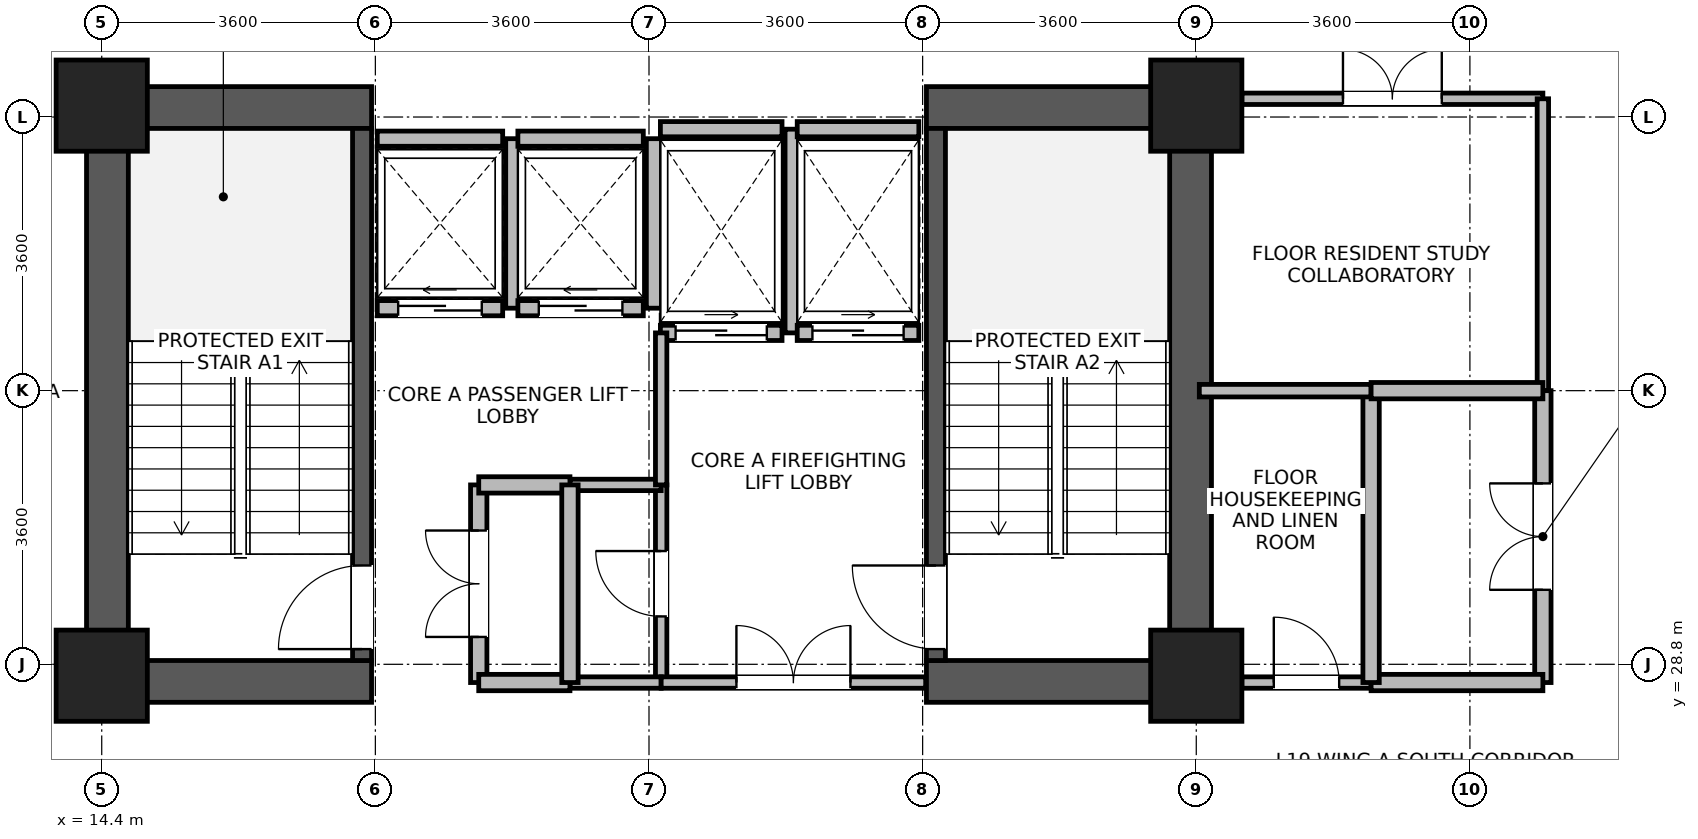
"""IFC4 building model, lengths in metres.
Left out: names, types, materials, properties, quantities, classifications, styles, units other than length and angle.
Written with IfcOpenShell. Run it as: python <this file> out.ifc"""

import sys

from ifc_helpers import new_model, si_unit, direction, frame, frame_2d, origin, origin_2d, place, context, subcontext, project, spatial, rectangle, extrude, source, transform, mapped, element, fill, save


model = new_model("IFC4")
c1 = context("Model", 3, precision=1e-05, world=origin(), true_north=direction((0.0, 1.0)))
c2 = subcontext(c1, "Body", "Model", "MODEL_VIEW")
j1 = project(units=[si_unit("LENGTHUNIT", "METRE"), si_unit("PLANEANGLEUNIT", "RADIAN")], contexts=[c1])
p1 = place(None, origin())
s1 = spatial("IfcSite", under=j1, at=p1, CompositionType="ELEMENT")
p2 = place(p1, origin())
s2 = spatial("IfcBuilding", under=s1, at=p2, CompositionType="ELEMENT")
p3 = place(p2, frame((0.0, 0.0, 78.6)))
s3 = spatial("IfcBuildingStorey", under=s2, at=p3, CompositionType="ELEMENT", Elevation=78.6)
for number, where, z_axis, x_axis in (
    (1, (14.475, 28.3, 0.0), (0.0, 0.0, 1.0), (0.0, 1.0, 0.0)),
    (2, (28.725, 28.3, 0.0), (0.0, 0.0, 1.0), (0.0, 1.0, 0.0)),
):
    element("IfcWall", number, at=place(p3, frame(where, z_axis=z_axis, x_axis=x_axis)), inside=s3, PredefinedType="SHEAR", context=c2, shape_type="SweptSolid", body=[
        extrude(rectangle(XDim=8.1, YDim=0.55, at=frame_2d((4.05, 0.0))), origin(), (0.0, 0.0, 1.0), 3.45),
    ])
for number, where, z_axis, x_axis in (
    (3, (14.75, 28.575, 0.0), (0.0, 0.0, 1.0), (1.0, 0.0, 0.0)),
    (4, (25.25, 28.575, 0.0), (0.0, 0.0, 1.0), (1.0, 0.0, 0.0)),
    (5, (14.75, 36.125, 0.0), (0.0, 0.0, 1.0), (1.0, 0.0, 0.0)),
    (6, (25.25, 36.125, 0.0), (0.0, 0.0, 1.0), (1.0, 0.0, 0.0)),
):
    element("IfcWall", number, at=place(p3, frame(where, z_axis=z_axis, x_axis=x_axis)), inside=s3, PredefinedType="SHEAR", context=c2, shape_type="SweptSolid", body=[
        extrude(rectangle(XDim=3.2, YDim=0.55, at=frame_2d((1.6, 0.0))), origin(), (0.0, 0.0, 1.0), 3.45),
    ])
p4 = place(p3, frame((17.825, 28.85, 0.0), z_axis=(0.0, 0.0, 1.0), x_axis=(0.0, 1.0, 0.0)))
e7 = element("IfcWall", 7, at=p4, inside=s3, PredefinedType="SHEAR", context=c2, shape_type="SweptSolid", body=[
    extrude(rectangle(XDim=7.0, YDim=0.25, at=frame_2d((3.5, 0.0))), origin(), (0.0, 0.0, 1.0), 3.45),
])
p5 = place(p4, frame((0.15, 0.0, 0.0)))
e8 = element("IfcOpeningElement", 8, at=p5, cuts=e7, PredefinedType="OPENING", context=c2, shape_type="SweptSolid", body=[
    extrude(rectangle(XDim=1.1, YDim=2.08, at=frame_2d((0.55, 1.04))), frame((0.0, 0.135, 0.0), z_axis=(0.0, -1.0, 0.0), x_axis=(1.0, 0.0, 0.0)), (0.0, 0.0, 1.0), 0.27),
])
p6 = place(p3, frame((25.375, 28.85, 0.0), z_axis=(0.0, 0.0, 1.0), x_axis=(0.0, 1.0, 0.0)))
e9 = element("IfcWall", 9, at=p6, inside=s3, PredefinedType="SHEAR", context=c2, shape_type="SweptSolid", body=[
    extrude(rectangle(XDim=7.0, YDim=0.25, at=frame_2d((3.5, 0.0))), origin(), (0.0, 0.0, 1.0), 3.45),
])
p7 = place(p6, frame((0.15, 0.0, 0.0)))
e10 = element("IfcOpeningElement", 10, at=p7, cuts=e9, PredefinedType="OPENING", context=c2, shape_type="SweptSolid", body=[
    extrude(rectangle(XDim=1.1, YDim=2.08, at=frame_2d((0.55, 1.04))), frame((0.0, 0.135, 0.0), z_axis=(0.0, -1.0, 0.0), x_axis=(1.0, 0.0, 0.0)), (0.0, 0.0, 1.0), 0.27),
])
m1 = source(origin(), c2, "Body", "SweptSolid", [
    extrude(rectangle(XDim=1.2, YDim=1.2, at=origin_2d()), origin(), (0.0, 0.0, 1.0), 3.7),
])
for number, where, z_axis, x_axis in (
    (11, (14.4, 28.65, 0.0), (0.0, 0.0, 1.0), (1.0, 0.0, 0.0)),
    (12, (14.4, 36.15, 0.0), (0.0, 0.0, 1.0), (1.0, 0.0, 0.0)),
    (13, (28.8, 28.65, 0.0), (0.0, 0.0, 1.0), (1.0, 0.0, 0.0)),
    (14, (28.8, 36.15, 0.0), (0.0, 0.0, 1.0), (1.0, 0.0, 0.0)),
):
    element("IfcColumn", number, at=place(p3, frame(where, z_axis=z_axis, x_axis=x_axis)), inside=s3, PredefinedType="COLUMN", context=c2, shape_type="MappedRepresentation", body=[
        mapped(m1, transform((0.0, 0.0, 0.0), x_axis=(1.0, 0.0, 0.0), y_axis=(0.0, 1.0, 0.0), z_axis=(0.0, 0.0, 1.0), scale=1.0)),
    ])
p8 = place(p3, frame((18.025, 33.485, 0.0), z_axis=(0.0, 0.0, 1.0), x_axis=(1.0, 0.0, 0.0)))
e15 = element("IfcWall", 15, at=p8, inside=s3, PredefinedType="PARTITIONING", context=c2, shape_type="SweptSolid", body=[
    extrude(rectangle(XDim=1.65, YDim=0.2, at=frame_2d((0.825, 0.0))), origin(), (0.0, 0.0, 1.0), 3.43),
])
p9 = place(p8, frame((0.275, 0.0, 0.0)))
e16 = element("IfcOpeningElement", 16, at=p9, cuts=e15, PredefinedType="OPENING", context=c2, shape_type="SweptSolid", body=[
    extrude(rectangle(XDim=1.1, YDim=2.12, at=frame_2d((0.55, 1.06))), frame((0.0, 0.11, 0.0), z_axis=(0.0, -1.0, 0.0), x_axis=(1.0, 0.0, 0.0)), (0.0, 0.0, 1.0), 0.22),
])
p10 = place(p3, frame((18.025, 35.715, 0.0), z_axis=(0.0, 0.0, 1.0), x_axis=(1.0, 0.0, 0.0)))
e17 = element("IfcWall", 17, at=p10, inside=s3, PredefinedType="PARTITIONING", context=c2, shape_type="SweptSolid", body=[
    extrude(rectangle(XDim=1.65, YDim=0.2, at=frame_2d((0.825, 0.0))), origin(), (0.0, 0.0, 1.0), 2.23),
])
p11 = place(p3, frame((19.815, 33.485, 0.0), z_axis=(0.0, 0.0, 1.0), x_axis=(0.0, 1.0, 0.0)))
e18 = element("IfcWall", 18, at=p11, inside=s3, PredefinedType="PARTITIONING", context=c2, shape_type="SweptSolid", body=[
    extrude(rectangle(XDim=2.23, YDim=0.2, at=frame_2d((1.115, 0.0))), origin(), (0.0, 0.0, 1.0), 3.43),
])
p12 = place(p3, frame((19.875, 33.485, 0.0), z_axis=(0.0, 0.0, 1.0), x_axis=(1.0, 0.0, 0.0)))
e19 = element("IfcWall", 19, at=p12, inside=s3, PredefinedType="PARTITIONING", context=c2, shape_type="SweptSolid", body=[
    extrude(rectangle(XDim=1.65, YDim=0.2, at=frame_2d((0.825, 0.0))), origin(), (0.0, 0.0, 1.0), 3.43),
])
p13 = place(p12, frame((0.275, 0.0, 0.0)))
e20 = element("IfcOpeningElement", 20, at=p13, cuts=e19, PredefinedType="OPENING", context=c2, shape_type="SweptSolid", body=[
    extrude(rectangle(XDim=1.1, YDim=2.12, at=frame_2d((0.55, 1.06))), frame((0.0, 0.11, 0.0), z_axis=(0.0, -1.0, 0.0), x_axis=(1.0, 0.0, 0.0)), (0.0, 0.0, 1.0), 0.22),
])
p14 = place(p3, frame((19.875, 35.715, 0.0), z_axis=(0.0, 0.0, 1.0), x_axis=(1.0, 0.0, 0.0)))
e21 = element("IfcWall", 21, at=p14, inside=s3, PredefinedType="PARTITIONING", context=c2, shape_type="SweptSolid", body=[
    extrude(rectangle(XDim=1.65, YDim=0.2, at=frame_2d((0.825, 0.0))), origin(), (0.0, 0.0, 1.0), 2.23),
])
p15 = place(p3, frame((21.665, 33.485, 0.0), z_axis=(0.0, 0.0, 1.0), x_axis=(0.0, 1.0, 0.0)))
e22 = element("IfcWall", 22, at=p15, inside=s3, PredefinedType="PARTITIONING", context=c2, shape_type="SweptSolid", body=[
    extrude(rectangle(XDim=2.23, YDim=0.2, at=frame_2d((1.115, 0.0))), origin(), (0.0, 0.0, 1.0), 3.43),
])
p16 = place(p3, frame((21.75, 33.16, 0.0), z_axis=(0.0, 0.0, 1.0), x_axis=(1.0, 0.0, 0.0)))
e23 = element("IfcWall", 23, at=p16, inside=s3, PredefinedType="PARTITIONING", context=c2, shape_type="SweptSolid", body=[
    extrude(rectangle(XDim=1.6, YDim=0.2, at=frame_2d((0.8, 0.0))), origin(), (0.0, 0.0, 1.0), 3.43),
])
p17 = place(p16, frame((0.2, 0.0, 0.0)))
e24 = element("IfcOpeningElement", 24, at=p17, cuts=e23, PredefinedType="OPENING", context=c2, shape_type="SweptSolid", body=[
    extrude(rectangle(XDim=1.2, YDim=2.12, at=frame_2d((0.6, 1.06))), frame((0.0, 0.11, 0.0), z_axis=(0.0, -1.0, 0.0), x_axis=(1.0, 0.0, 0.0)), (0.0, 0.0, 1.0), 0.22),
])
p18 = place(p3, frame((21.75, 35.84, 0.0), z_axis=(0.0, 0.0, 1.0), x_axis=(1.0, 0.0, 0.0)))
e25 = element("IfcWall", 25, at=p18, inside=s3, PredefinedType="PARTITIONING", context=c2, shape_type="SweptSolid", body=[
    extrude(rectangle(XDim=1.6, YDim=0.2, at=frame_2d((0.8, 0.0))), origin(), (0.0, 0.0, 1.0), 2.23),
])
p19 = place(p3, frame((23.49, 33.16, 0.0), z_axis=(0.0, 0.0, 1.0), x_axis=(0.0, 1.0, 0.0)))
e26 = element("IfcWall", 26, at=p19, inside=s3, PredefinedType="PARTITIONING", context=c2, shape_type="SweptSolid", body=[
    extrude(rectangle(XDim=2.68, YDim=0.2, at=frame_2d((1.34, 0.0))), origin(), (0.0, 0.0, 1.0), 3.43),
])
p20 = place(p3, frame((23.55, 33.16, 0.0), z_axis=(0.0, 0.0, 1.0), x_axis=(1.0, 0.0, 0.0)))
e27 = element("IfcWall", 27, at=p20, inside=s3, PredefinedType="PARTITIONING", context=c2, shape_type="SweptSolid", body=[
    extrude(rectangle(XDim=1.6, YDim=0.2, at=frame_2d((0.8, 0.0))), origin(), (0.0, 0.0, 1.0), 3.43),
])
p21 = place(p20, frame((0.2, 0.0, 0.0)))
e28 = element("IfcOpeningElement", 28, at=p21, cuts=e27, PredefinedType="OPENING", context=c2, shape_type="SweptSolid", body=[
    extrude(rectangle(XDim=1.2, YDim=2.12, at=frame_2d((0.6, 1.06))), frame((0.0, 0.11, 0.0), z_axis=(0.0, -1.0, 0.0), x_axis=(1.0, 0.0, 0.0)), (0.0, 0.0, 1.0), 0.22),
])
p22 = place(p3, frame((23.55, 35.84, 0.0), z_axis=(0.0, 0.0, 1.0), x_axis=(1.0, 0.0, 0.0)))
e29 = element("IfcWall", 29, at=p22, inside=s3, PredefinedType="PARTITIONING", context=c2, shape_type="SweptSolid", body=[
    extrude(rectangle(XDim=1.6, YDim=0.2, at=frame_2d((0.8, 0.0))), origin(), (0.0, 0.0, 1.0), 2.23),
])
p23 = place(p3, frame((29.4, 36.24, 0.0), z_axis=(0.0, 0.0, 1.0), x_axis=(1.0, 0.0, 0.0)))
e30 = element("IfcWall", 30, at=p23, inside=s3, PredefinedType="PARTITIONING", context=c2, shape_type="SweptSolid", body=[
    extrude(rectangle(XDim=3.96, YDim=0.15, at=frame_2d((1.98, 0.0))), origin(), (0.0, 0.0, 1.0), 2.78),
])
p24 = place(p23, frame((1.33, 0.0, 0.0)))
e31 = element("IfcOpeningElement", 31, at=p24, cuts=e30, PredefinedType="OPENING", context=c2, shape_type="SweptSolid", body=[
    extrude(rectangle(XDim=1.3, YDim=2.12, at=frame_2d((0.65, 1.06))), frame((0.0, 0.085, 0.0), z_axis=(0.0, -1.0, 0.0), x_axis=(1.0, 0.0, 0.0)), (0.0, 0.0, 1.0), 0.17),
])
p25 = place(p3, frame((33.36, 32.4, 0.0), z_axis=(0.0, 0.0, 1.0), x_axis=(0.0, 1.0, 0.0)))
e32 = element("IfcWall", 32, at=p25, inside=s3, PredefinedType="PARTITIONING", context=c2, shape_type="SweptSolid", body=[
    extrude(rectangle(XDim=3.84, YDim=0.15, at=frame_2d((1.92, 0.0))), origin(), (0.0, 0.0, 1.0), 3.43),
])
p26 = place(p3, frame((33.36, 28.56, 0.0), z_axis=(0.0, 0.0, 1.0), x_axis=(0.0, 1.0, 0.0)))
e33 = element("IfcWall", 33, at=p26, inside=s3, PredefinedType="PARTITIONING", context=c2, shape_type="SweptSolid", body=[
    extrude(rectangle(XDim=3.84, YDim=0.215, at=frame_2d((1.92, 0.0))), origin(), (0.0, 0.0, 1.0), 3.43),
])
p27 = place(p26, frame((1.22, 0.0, 0.0)))
e34 = element("IfcOpeningElement", 34, at=p27, cuts=e33, PredefinedType="OPENING", context=c2, shape_type="SweptSolid", body=[
    extrude(rectangle(XDim=1.4, YDim=2.15, at=frame_2d((0.7, 1.075))), frame((0.0, 0.118, 0.0), z_axis=(0.0, -1.0, 0.0), x_axis=(1.0, 0.0, 0.0)), (0.0, 0.0, 1.0), 0.235),
])
p28 = place(p3, frame((19.36, 28.56, 0.0), z_axis=(0.0, 0.0, 1.0), x_axis=(0.0, 1.0, 0.0)))
e35 = element("IfcWall", 35, at=p28, inside=s3, PredefinedType="PARTITIONING", context=c2, shape_type="SweptSolid", body=[
    extrude(rectangle(XDim=2.6, YDim=0.215, at=frame_2d((1.3, 0.0))), origin(), (0.0, 0.0, 1.0), 3.43),
])
p29 = place(p28, frame((0.6, 0.0, 0.0)))
e36 = element("IfcOpeningElement", 36, at=p29, cuts=e35, PredefinedType="OPENING", context=c2, shape_type="SweptSolid", body=[
    extrude(rectangle(XDim=1.4, YDim=2.15, at=frame_2d((0.7, 1.075))), frame((0.0, 0.118, 0.0), z_axis=(0.0, -1.0, 0.0), x_axis=(1.0, 0.0, 0.0)), (0.0, 0.0, 1.0), 0.235),
])
p30 = place(p3, frame((21.76, 28.56, 0.0), z_axis=(0.0, 0.0, 1.0), x_axis=(0.0, 1.0, 0.0)))
e37 = element("IfcWall", 37, at=p30, inside=s3, PredefinedType="PARTITIONING", context=c2, shape_type="SweptSolid", body=[
    extrude(rectangle(XDim=2.6, YDim=0.15, at=frame_2d((1.3, 0.0))), origin(), (0.0, 0.0, 1.0), 3.43),
])
p31 = place(p30, frame((0.87, 0.0, 0.0)))
e38 = element("IfcOpeningElement", 38, at=p31, cuts=e37, PredefinedType="OPENING", context=c2, shape_type="SweptSolid", body=[
    extrude(rectangle(XDim=0.86, YDim=2.02, at=frame_2d((0.43, 1.01))), frame((0.0, 0.085, 0.0), z_axis=(0.0, -1.0, 0.0), x_axis=(1.0, 0.0, 0.0)), (0.0, 0.0, 1.0), 0.17),
])
p32 = place(p3, frame((29.4, 28.56, 0.0), z_axis=(0.0, 0.0, 1.0), x_axis=(1.0, 0.0, 0.0)))
e39 = element("IfcWall", 39, at=p32, inside=s3, PredefinedType="PARTITIONING", context=c2, shape_type="SweptSolid", body=[
    extrude(rectangle(XDim=1.7, YDim=0.15, at=frame_2d((0.85, 0.0))), origin(), (0.0, 0.0, 1.0), 2.78),
])
p33 = place(p32, frame((0.42, 0.0, 0.0)))
e40 = element("IfcOpeningElement", 40, at=p33, cuts=e39, PredefinedType="OPENING", context=c2, shape_type="SweptSolid", body=[
    extrude(rectangle(XDim=0.86, YDim=2.02, at=frame_2d((0.43, 1.01))), frame((0.0, 0.085, 0.0), z_axis=(0.0, -1.0, 0.0), x_axis=(1.0, 0.0, 0.0)), (0.0, 0.0, 1.0), 0.17),
])
p34 = place(p3, frame((31.1, 28.56, 0.0), z_axis=(0.0, 0.0, 1.0), x_axis=(1.0, 0.0, 0.0)))
e41 = element("IfcWall", 41, at=p34, inside=s3, PredefinedType="PARTITIONING", context=c2, shape_type="SweptSolid", body=[
    extrude(rectangle(XDim=2.26, YDim=0.215, at=frame_2d((1.13, 0.0))), origin(), (0.0, 0.0, 1.0), 2.78),
])
p35 = place(p3, frame((20.56, 28.56, 0.0), z_axis=(0.0, 0.0, 1.0), x_axis=(1.0, 0.0, 0.0)))
e42 = element("IfcWall", 42, at=p35, inside=s3, PredefinedType="PARTITIONING", context=c2, shape_type="SweptSolid", body=[
    extrude(rectangle(XDim=1.2, YDim=0.15, at=frame_2d((0.6, 0.0))), origin(), (0.0, 0.0, 1.0), 2.23),
])
p36 = place(p3, frame((20.56, 31.16, 0.0), z_axis=(0.0, 0.0, 1.0), x_axis=(1.0, 0.0, 0.0)))
e43 = element("IfcWall", 43, at=p36, inside=s3, PredefinedType="PARTITIONING", context=c2, shape_type="SweptSolid", body=[
    extrude(rectangle(XDim=1.2, YDim=0.15, at=frame_2d((0.6, 0.0))), origin(), (0.0, 0.0, 1.0), 3.43),
])
p37 = place(p3, frame((19.36, 28.56, 0.0), z_axis=(0.0, 0.0, 1.0), x_axis=(1.0, 0.0, 0.0)))
e44 = element("IfcWall", 44, at=p37, inside=s3, PredefinedType="PARTITIONING", context=c2, shape_type="SweptSolid", body=[
    extrude(rectangle(XDim=1.2, YDim=0.215, at=frame_2d((0.6, 0.0))), origin(), (0.0, 0.0, 1.0), 2.23),
])
p38 = place(p3, frame((19.36, 31.16, 0.0), z_axis=(0.0, 0.0, 1.0), x_axis=(1.0, 0.0, 0.0)))
e45 = element("IfcWall", 45, at=p38, inside=s3, PredefinedType="PARTITIONING", context=c2, shape_type="SweptSolid", body=[
    extrude(rectangle(XDim=1.2, YDim=0.215, at=frame_2d((0.6, 0.0))), origin(), (0.0, 0.0, 1.0), 3.43),
])
p39 = place(p3, frame((31.1, 28.56, 0.0), z_axis=(0.0, 0.0, 1.0), x_axis=(0.0, 1.0, 0.0)))
e46 = element("IfcWall", 46, at=p39, inside=s3, PredefinedType="PARTITIONING", context=c2, shape_type="SweptSolid", body=[
    extrude(rectangle(XDim=3.84, YDim=0.215, at=frame_2d((1.92, 0.0))), origin(), (0.0, 0.0, 1.0), 3.43),
])
p40 = place(p3, frame((21.76, 28.56, 0.0), z_axis=(0.0, 0.0, 1.0), x_axis=(1.0, 0.0, 0.0)))
e47 = element("IfcWall", 47, at=p40, inside=s3, PredefinedType="PARTITIONING", context=c2, shape_type="SweptSolid", body=[
    extrude(rectangle(XDim=3.48, YDim=0.15, at=frame_2d((1.74, 0.0))), origin(), (0.0, 0.0, 1.0), 2.23),
])
p41 = place(p40, frame((0.99, 0.0, 0.0)))
e48 = element("IfcOpeningElement", 48, at=p41, cuts=e47, PredefinedType="OPENING", context=c2, shape_type="SweptSolid", body=[
    extrude(rectangle(XDim=1.5, YDim=2.1, at=frame_2d((0.75, 1.05))), frame((0.0, 0.085, 0.0), z_axis=(0.0, -1.0, 0.0), x_axis=(1.0, 0.0, 0.0)), (0.0, 0.0, 1.0), 0.17),
])
p42 = place(p3, frame((20.56, 28.56, 0.0), z_axis=(0.0, 0.0, 1.0), x_axis=(0.0, 1.0, 0.0)))
e49 = element("IfcWall", 49, at=p42, inside=s3, PredefinedType="PARTITIONING", context=c2, shape_type="SweptSolid", body=[
    extrude(rectangle(XDim=2.6, YDim=0.215, at=frame_2d((1.3, 0.0))), origin(), (0.0, 0.0, 1.0), 3.43),
])
p43 = place(p3, frame((28.84, 32.4, 0.0), z_axis=(0.0, 0.0, 1.0), x_axis=(1.0, 0.0, 0.0)))
e50 = element("IfcWall", 50, at=p43, inside=s3, PredefinedType="PARTITIONING", context=c2, shape_type="SweptSolid", body=[
    extrude(rectangle(XDim=2.26, YDim=0.165, at=frame_2d((1.13, 0.0))), origin(), (0.0, 0.0, 1.0), 3.43),
])
p44 = place(p3, frame((31.1, 32.4, 0.0), z_axis=(0.0, 0.0, 1.0), x_axis=(1.0, 0.0, 0.0)))
e51 = element("IfcWall", 51, at=p44, inside=s3, PredefinedType="PARTITIONING", context=c2, shape_type="SweptSolid", body=[
    extrude(rectangle(XDim=2.26, YDim=0.215, at=frame_2d((1.13, 0.0))), origin(), (0.0, 0.0, 1.0), 3.43),
])
p45 = place(p3, frame((21.76, 31.16, 0.0), z_axis=(0.0, 0.0, 1.0), x_axis=(0.0, 1.0, 0.0)))
e52 = element("IfcWall", 52, at=p45, inside=s3, PredefinedType="PARTITIONING", context=c2, shape_type="SweptSolid", body=[
    extrude(rectangle(XDim=2.0, YDim=0.15, at=frame_2d((1.0, 0.0))), origin(), (0.0, 0.0, 1.0), 3.43),
])
p46 = place(p5, origin())
e53 = element("IfcDoor", 53, at=p46, inside=s3, OperationType="SINGLE_SWING_LEFT", PredefinedType="DOOR", context=c2, shape_type="SweptSolid", body=[
    extrude(rectangle(XDim=1.1, YDim=2.08, at=frame_2d((0.55, 1.04))), frame((0.0, 0.025, 0.0), z_axis=(0.0, -1.0, 0.0), x_axis=(1.0, 0.0, 0.0)), (0.0, 0.0, 1.0), 0.05),
])
fill(e8, e53)
p47 = place(p7, origin())
e54 = element("IfcDoor", 54, at=p47, inside=s3, OperationType="SINGLE_SWING_RIGHT", PredefinedType="DOOR", context=c2, shape_type="SweptSolid", body=[
    extrude(rectangle(XDim=1.1, YDim=2.08, at=frame_2d((0.55, 1.04))), frame((0.0, 0.025, 0.0), z_axis=(0.0, -1.0, 0.0), x_axis=(1.0, 0.0, 0.0)), (0.0, 0.0, 1.0), 0.05),
])
fill(e10, e54)
p48 = place(p9, origin())
e55 = element("IfcDoor", 55, at=p48, inside=s3, OperationType="SLIDING_TO_LEFT", PredefinedType="DOOR", context=c2, shape_type="SweptSolid", body=[
    extrude(rectangle(XDim=1.1, YDim=2.12, at=frame_2d((0.55, 1.06))), frame((0.0, 0.025, 0.0), z_axis=(0.0, -1.0, 0.0), x_axis=(1.0, 0.0, 0.0)), (0.0, 0.0, 1.0), 0.05),
])
fill(e16, e55)
p49 = place(p13, origin())
e56 = element("IfcDoor", 56, at=p49, inside=s3, OperationType="SLIDING_TO_LEFT", PredefinedType="DOOR", context=c2, shape_type="SweptSolid", body=[
    extrude(rectangle(XDim=1.1, YDim=2.12, at=frame_2d((0.55, 1.06))), frame((0.0, 0.025, 0.0), z_axis=(0.0, -1.0, 0.0), x_axis=(1.0, 0.0, 0.0)), (0.0, 0.0, 1.0), 0.05),
])
fill(e20, e56)
p50 = place(p17, origin())
e57 = element("IfcDoor", 57, at=p50, inside=s3, OperationType="SLIDING_TO_RIGHT", PredefinedType="DOOR", context=c2, shape_type="SweptSolid", body=[
    extrude(rectangle(XDim=1.2, YDim=2.12, at=frame_2d((0.6, 1.06))), frame((0.0, 0.025, 0.0), z_axis=(0.0, -1.0, 0.0), x_axis=(1.0, 0.0, 0.0)), (0.0, 0.0, 1.0), 0.05),
])
fill(e24, e57)
p51 = place(p21, origin())
e58 = element("IfcDoor", 58, at=p51, inside=s3, OperationType="SLIDING_TO_RIGHT", PredefinedType="DOOR", context=c2, shape_type="SweptSolid", body=[
    extrude(rectangle(XDim=1.2, YDim=2.12, at=frame_2d((0.6, 1.06))), frame((0.0, 0.025, 0.0), z_axis=(0.0, -1.0, 0.0), x_axis=(1.0, 0.0, 0.0)), (0.0, 0.0, 1.0), 0.05),
])
fill(e28, e58)
p52 = place(p24, origin())
e59 = element("IfcDoor", 59, at=p52, inside=s3, OperationType="DOUBLE_DOOR_SINGLE_SWING", PredefinedType="DOOR", context=c2, shape_type="SweptSolid", body=[
    extrude(rectangle(XDim=1.3, YDim=2.12, at=frame_2d((0.65, 1.06))), frame((0.0, 0.025, 0.0), z_axis=(0.0, -1.0, 0.0), x_axis=(1.0, 0.0, 0.0)), (0.0, 0.0, 1.0), 0.05),
])
fill(e31, e59)
p53 = place(p27, origin())
e60 = element("IfcDoor", 60, at=p53, inside=s3, OperationType="DOUBLE_DOOR_SINGLE_SWING", PredefinedType="DOOR", context=c2, shape_type="SweptSolid", body=[
    extrude(rectangle(XDim=1.4, YDim=2.15, at=frame_2d((0.7, 1.075))), frame((0.0, 0.025, 0.0), z_axis=(0.0, -1.0, 0.0), x_axis=(1.0, 0.0, 0.0)), (0.0, 0.0, 1.0), 0.05),
])
fill(e34, e60)
p54 = place(p29, origin())
e61 = element("IfcDoor", 61, at=p54, inside=s3, OperationType="DOUBLE_DOOR_SINGLE_SWING", PredefinedType="DOOR", context=c2, shape_type="SweptSolid", body=[
    extrude(rectangle(XDim=1.4, YDim=2.15, at=frame_2d((0.7, 1.075))), frame((0.0, 0.025, 0.0), z_axis=(0.0, -1.0, 0.0), x_axis=(1.0, 0.0, 0.0)), (0.0, 0.0, 1.0), 0.05),
])
fill(e36, e61)
p55 = place(p31, origin())
e62 = element("IfcDoor", 62, at=p55, inside=s3, OperationType="SINGLE_SWING_RIGHT", PredefinedType="DOOR", context=c2, shape_type="SweptSolid", body=[
    extrude(rectangle(XDim=0.86, YDim=2.02, at=frame_2d((0.43, 1.01))), frame((0.0, 0.025, 0.0), z_axis=(0.0, -1.0, 0.0), x_axis=(1.0, 0.0, 0.0)), (0.0, 0.0, 1.0), 0.05),
])
fill(e38, e62)
p56 = place(p33, origin())
e63 = element("IfcDoor", 63, at=p56, inside=s3, OperationType="SINGLE_SWING_LEFT", PredefinedType="DOOR", context=c2, shape_type="SweptSolid", body=[
    extrude(rectangle(XDim=0.86, YDim=2.02, at=frame_2d((0.43, 1.01))), frame((0.0, 0.025, 0.0), z_axis=(0.0, -1.0, 0.0), x_axis=(1.0, 0.0, 0.0)), (0.0, 0.0, 1.0), 0.05),
])
fill(e40, e63)
p57 = place(p41, origin())
e64 = element("IfcDoor", 64, at=p57, inside=s3, OperationType="DOUBLE_DOOR_SINGLE_SWING", PredefinedType="DOOR", context=c2, shape_type="SweptSolid", body=[
    extrude(rectangle(XDim=1.5, YDim=2.1, at=frame_2d((0.75, 1.05))), frame((0.0, 0.025, 0.0), z_axis=(0.0, -1.0, 0.0), x_axis=(1.0, 0.0, 0.0)), (0.0, 0.0, 1.0), 0.05),
])
fill(e48, e64)
save(model, sys.argv[1])
